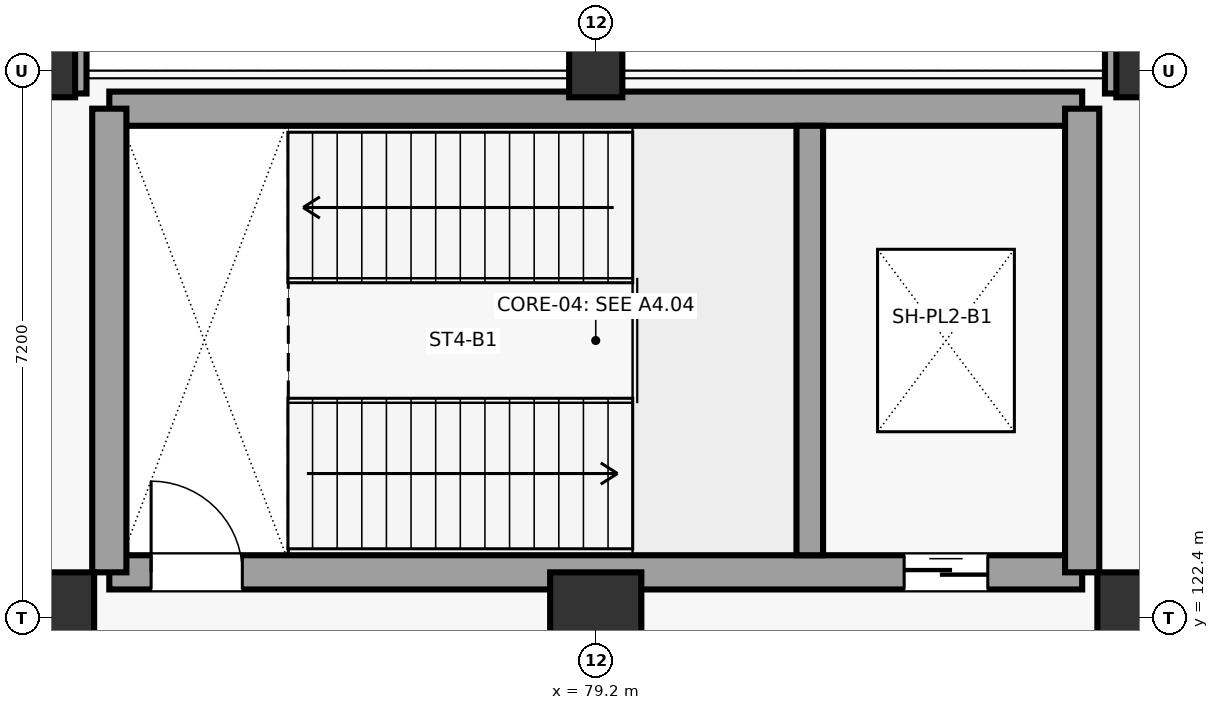
"""IFC4 building model, lengths in metres.
Left out: names, types, materials, properties, quantities, classifications, styles, units other than length and angle.
Written with IfcOpenShell. Run it as: python <this file> out.ifc"""

import sys

from ifc_helpers import new_model, si_unit, direction, frame, frame_2d, origin, origin_2d, place, context, subcontext, project, spatial, rectangle, circle, extrude, element, fill, save


model = new_model("IFC4")
c1 = context("Model", 3, precision=1e-05, world=origin(), true_north=direction((0.0, 1.0)))
c2 = subcontext(c1, "Body", "Model", "MODEL_VIEW")
j1 = project(units=[si_unit("LENGTHUNIT", "METRE"), si_unit("PLANEANGLEUNIT", "RADIAN")], contexts=[c1])
p1 = place(None, origin())
s1 = spatial("IfcSite", under=j1, at=p1, CompositionType="ELEMENT")
p2 = place(p1, origin())
s2 = spatial("IfcBuilding", under=s1, at=p2, CompositionType="ELEMENT")
p3 = place(p2, frame((0.0, 0.0, -5.4)))
s3 = spatial("IfcBuildingStorey", under=s2, at=p3, CompositionType="ELEMENT", Elevation=-5.4)
p4 = place(p3, frame((72.0, 122.4, 0.0), z_axis=(0.0, 0.0, 1.0), x_axis=(1.0, 0.0, 0.0)))
e1 = element("IfcColumn", 1, at=p4, inside=s3, PredefinedType="COLUMN", context=c2, shape_type="SweptSolid", body=[
    extrude(circle(Radius=0.6, at=origin_2d()), origin(), (0.0, 0.0, 1.0), 5.4),
])
p5 = place(p3, frame((72.0, 129.6, 0.0), z_axis=(0.0, 0.0, 1.0), x_axis=(1.0, 0.0, 0.0)))
e2 = element("IfcColumn", 2, at=p5, inside=s3, PredefinedType="COLUMN", context=c2, shape_type="SweptSolid", body=[
    extrude(rectangle(XDim=0.7, YDim=0.7, at=origin_2d()), origin(), (0.0, 0.0, 1.0), 5.4),
])
p6 = place(p3, frame((79.2, 122.4, 0.0), z_axis=(0.0, 0.0, 1.0), x_axis=(1.0, 0.0, 0.0)))
e3 = element("IfcColumn", 3, at=p6, inside=s3, PredefinedType="COLUMN", context=c2, shape_type="SweptSolid", body=[
    extrude(circle(Radius=0.6, at=origin_2d()), origin(), (0.0, 0.0, 1.0), 5.4),
])
p7 = place(p3, frame((79.2, 129.6, 0.0), z_axis=(0.0, 0.0, 1.0), x_axis=(1.0, 0.0, 0.0)))
e4 = element("IfcColumn", 4, at=p7, inside=s3, PredefinedType="COLUMN", context=c2, shape_type="SweptSolid", body=[
    extrude(rectangle(XDim=0.7, YDim=0.7, at=origin_2d()), origin(), (0.0, 0.0, 1.0), 5.4),
])
p8 = place(p3, frame((86.4, 122.4, 0.0), z_axis=(0.0, 0.0, 1.0), x_axis=(1.0, 0.0, 0.0)))
e5 = element("IfcColumn", 5, at=p8, inside=s3, PredefinedType="COLUMN", context=c2, shape_type="SweptSolid", body=[
    extrude(circle(Radius=0.6, at=origin_2d()), origin(), (0.0, 0.0, 1.0), 5.4),
])
p9 = place(p3, frame((86.4, 129.6, 0.0), z_axis=(0.0, 0.0, 1.0), x_axis=(1.0, 0.0, 0.0)))
e6 = element("IfcColumn", 6, at=p9, inside=s3, PredefinedType="COLUMN", context=c2, shape_type="SweptSolid", body=[
    extrude(rectangle(XDim=0.7, YDim=0.7, at=origin_2d()), origin(), (0.0, 0.0, 1.0), 5.4),
])
p10 = place(p3, frame((42.7, 129.6, 0.0), z_axis=(0.0, 0.0, 1.0), x_axis=(1.0, 0.0, 0.0)))
e7 = element("IfcWall", 7, at=p10, inside=s3, PredefinedType="USERDEFINED", context=c2, shape_type="SweptSolid", body=[
    extrude(rectangle(XDim=29.8, YDim=0.6, at=frame_2d((14.9, 0.0))), origin(), (0.0, 0.0, 1.0), 4.98),
])
p11 = place(p3, frame((85.9, 129.6, 0.0), z_axis=(0.0, 0.0, 1.0), x_axis=(1.0, 0.0, 0.0)))
e8 = element("IfcWall", 8, at=p11, inside=s3, PredefinedType="USERDEFINED", context=c2, shape_type="SweptSolid", body=[
    extrude(rectangle(XDim=86.9, YDim=0.6, at=frame_2d((43.45, 0.0))), origin(), (0.0, 0.0, 1.0), 4.98),
])
p12 = place(p3, frame((72.8, 123.0, 0.0), z_axis=(0.0, 0.0, 1.0), x_axis=(1.0, 0.0, 0.0)))
e9 = element("IfcWall", 9, at=p12, inside=s3, PredefinedType="SHEAR", context=c2, shape_type="SweptSolid", body=[
    extrude(rectangle(XDim=12.8, YDim=0.45, at=frame_2d((6.4, 0.0))), origin(), (0.0, 0.0, 1.0), 5.02),
])
p13 = place(p12, frame((0.55, 0.0, 0.0)))
e10 = element("IfcOpeningElement", 10, at=p13, cuts=e9, PredefinedType="OPENING", context=c2, shape_type="SweptSolid", body=[
    extrude(rectangle(XDim=1.2, YDim=2.25, at=frame_2d((0.6, 1.125))), frame((0.0, 0.235, 0.0), z_axis=(0.0, -1.0, 0.0), x_axis=(1.0, 0.0, 0.0)), (0.0, 0.0, 1.0), 0.47),
])
p14 = place(p12, frame((10.458, 0.0, 0.0)))
e11 = element("IfcOpeningElement", 11, at=p14, cuts=e9, PredefinedType="OPENING", context=c2, shape_type="SweptSolid", body=[
    extrude(rectangle(XDim=1.1, YDim=2.2, at=frame_2d((0.55, 1.1))), frame((0.0, 0.235, 0.0), z_axis=(0.0, -1.0, 0.0), x_axis=(1.0, 0.0, 0.0)), (0.0, 0.0, 1.0), 0.47),
])
p15 = place(p3, frame((72.8, 129.1, 0.0), z_axis=(0.0, 0.0, 1.0), x_axis=(1.0, 0.0, 0.0)))
e12 = element("IfcWall", 12, at=p15, inside=s3, PredefinedType="SHEAR", context=c2, shape_type="SweptSolid", body=[
    extrude(rectangle(XDim=12.8, YDim=0.45, at=frame_2d((6.4, 0.0))), origin(), (0.0, 0.0, 1.0), 5.02),
])
for number, where, z_axis, x_axis in (
    (13, (72.8, 123.0, 0.0), (0.0, 0.0, 1.0), (0.0, 1.0, 0.0)),
    (14, (85.6, 123.0, 0.0), (0.0, 0.0, 1.0), (0.0, 1.0, 0.0)),
):
    element("IfcWall", number, at=place(p3, frame(where, z_axis=z_axis, x_axis=x_axis)), inside=s3, PredefinedType="SHEAR", context=c2, shape_type="SweptSolid", body=[
        extrude(rectangle(XDim=6.1, YDim=0.45, at=frame_2d((3.05, 0.0))), origin(), (0.0, 0.0, 1.0), 5.02),
    ])
p16 = place(p3, frame((82.016, 123.225, 0.0), z_axis=(0.0, 0.0, 1.0), x_axis=(0.0, 1.0, 0.0)))
e15 = element("IfcWall", 15, at=p16, inside=s3, PredefinedType="SHEAR", context=c2, shape_type="SweptSolid", body=[
    extrude(rectangle(XDim=5.65, YDim=0.35, at=frame_2d((2.825, 0.0))), origin(), (0.0, 0.0, 1.0), 5.02),
])
p17 = place(p13, origin())
e16 = element("IfcDoor", 16, at=p17, inside=s3, OperationType="SINGLE_SWING_LEFT", PredefinedType="DOOR", context=c2, shape_type="SweptSolid", body=[
    extrude(rectangle(XDim=1.2, YDim=2.25, at=frame_2d((0.6, 1.125))), frame((0.0, 0.025, 0.0), z_axis=(0.0, -1.0, 0.0), x_axis=(1.0, 0.0, 0.0)), (0.0, 0.0, 1.0), 0.05),
])
fill(e10, e16)
p18 = place(p14, origin())
e17 = element("IfcDoor", 17, at=p18, inside=s3, OperationType="SLIDING_TO_LEFT", PredefinedType="DOOR", context=c2, shape_type="SweptSolid", body=[
    extrude(rectangle(XDim=1.1, YDim=2.2, at=frame_2d((0.55, 1.1))), frame((0.0, 0.025, 0.0), z_axis=(0.0, -1.0, 0.0), x_axis=(1.0, 0.0, 0.0)), (0.0, 0.0, 1.0), 0.05),
])
fill(e11, e17)
save(model, sys.argv[1])
